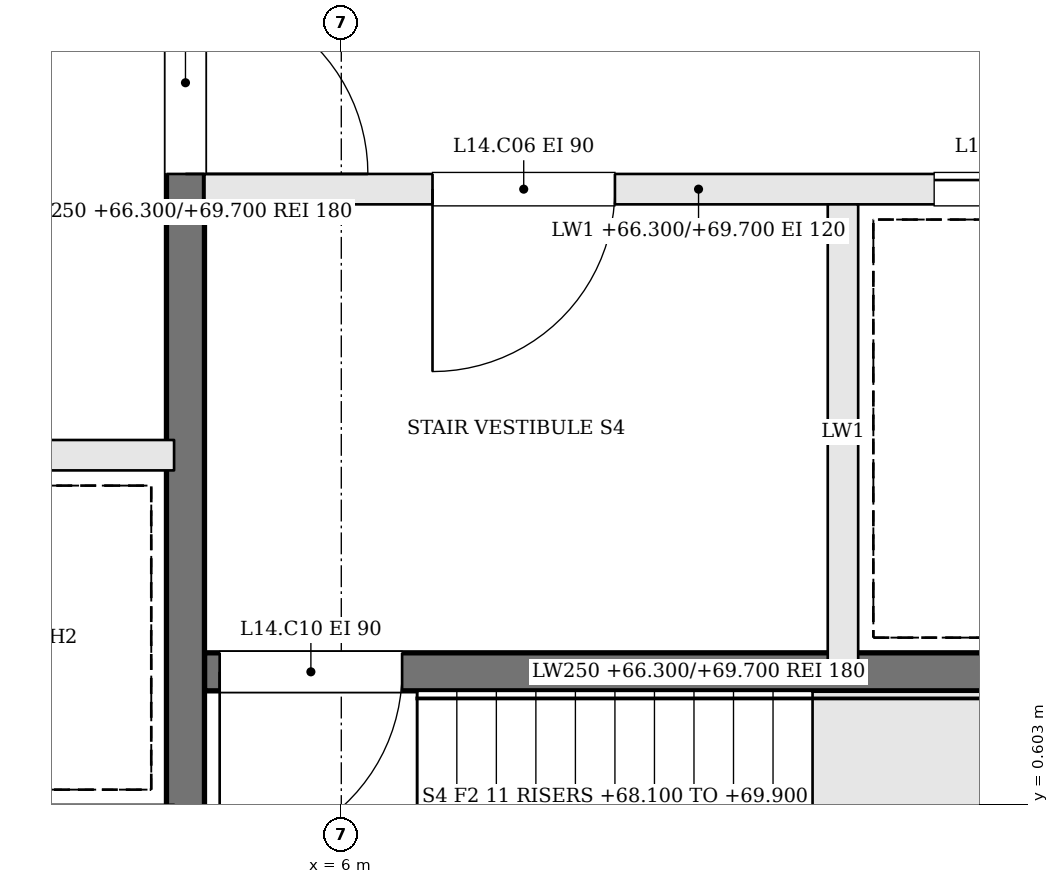
"""IFC4 building model, lengths in metres.
Left out: names, types, materials, properties, quantities, classifications, styles, units other than length and angle.
Written with IfcOpenShell. Run it as: python <this file> out.ifc"""

import sys

from ifc_helpers import new_model, si_unit, direction, frame, frame_2d, origin, place, context, subcontext, project, spatial, rectangle, extrude, element, fill, save


model = new_model("IFC4")
c1 = context("Model", 3, precision=1e-05, world=origin(), true_north=direction((0.0, 1.0)))
c2 = subcontext(c1, "Body", "Model", "MODEL_VIEW")
j1 = project(units=[si_unit("LENGTHUNIT", "METRE"), si_unit("PLANEANGLEUNIT", "RADIAN")], contexts=[c1])
p1 = place(None, origin())
s1 = spatial("IfcSite", under=j1, at=p1, CompositionType="ELEMENT")
p2 = place(p1, origin())
s2 = spatial("IfcBuilding", under=s1, at=p2, CompositionType="ELEMENT")
p3 = place(p2, frame((0.0, 0.0, 66.3)))
s3 = spatial("IfcBuildingStorey", under=s2, at=p3, CompositionType="ELEMENT", Elevation=66.3)
p4 = place(p3, frame((11.6, 4.65, 0.0), z_axis=(0.0, 0.0, 1.0), x_axis=(-1.0, 0.0, 0.0)))
e1 = element("IfcWall", 1, at=p4, inside=s3, PredefinedType="SOLIDWALL", context=c2, shape_type="SweptSolid", body=[
    extrude(rectangle(XDim=6.5, YDim=0.2, at=frame_2d((3.25, 0.0))), origin(), (0.0, 0.0, 1.0), 3.4),
])
p5 = place(p4, frame((3.8, 0.0, 0.0)))
e2 = element("IfcOpeningElement", 2, at=p5, cuts=e1, PredefinedType="OPENING", context=c2, shape_type="SweptSolid", body=[
    extrude(rectangle(XDim=1.2, YDim=2.1, at=frame_2d((0.6, 1.05))), frame((0.0, 0.11, 0.0), z_axis=(0.0, -1.0, 0.0), x_axis=(1.0, 0.0, 0.0)), (0.0, 0.0, 1.0), 0.22),
])
p6 = place(p4, frame((0.5, 0.0, 0.0)))
e3 = element("IfcOpeningElement", 3, at=p6, cuts=e1, PredefinedType="OPENING", context=c2, shape_type="SweptSolid", body=[
    extrude(rectangle(XDim=1.2, YDim=2.1, at=frame_2d((0.6, 1.05))), frame((0.0, 0.11, 0.0), z_axis=(0.0, -1.0, 0.0), x_axis=(1.0, 0.0, 0.0)), (0.0, 0.0, 1.0), 0.22),
])
p7 = place(p3, frame((11.6, 1.475, 0.0), z_axis=(0.0, 0.0, 1.0), x_axis=(-1.0, 0.0, 0.0)))
e4 = element("IfcWall", 4, at=p7, inside=s3, PredefinedType="SOLIDWALL", context=c2, shape_type="SweptSolid", body=[
    extrude(rectangle(XDim=6.5, YDim=0.25, at=frame_2d((3.25, 0.0))), origin(), (0.0, 0.0, 1.0), 3.4),
])
p8 = place(p7, frame((5.2, 0.0, 0.0)))
e5 = element("IfcOpeningElement", 5, at=p8, cuts=e4, PredefinedType="OPENING", context=c2, shape_type="SweptSolid", body=[
    extrude(rectangle(XDim=1.2, YDim=2.1, at=frame_2d((0.6, 1.05))), frame((0.0, 0.135, 0.0), z_axis=(0.0, -1.0, 0.0), x_axis=(1.0, 0.0, 0.0)), (0.0, 0.0, 1.0), 0.27),
])
p9 = place(p3, frame((9.3, 4.55, 0.0), z_axis=(0.0, 0.0, 1.0), x_axis=(0.0, -1.0, 0.0)))
e6 = element("IfcWall", 6, at=p9, inside=s3, PredefinedType="SOLIDWALL", context=c2, shape_type="SweptSolid", body=[
    extrude(rectangle(XDim=3.0, YDim=0.2, at=frame_2d((1.5, 0.0))), origin(), (0.0, 0.0, 1.0), 3.4),
])
p10 = place(p3, frame((4.975, 10.6, 0.0), z_axis=(0.0, 0.0, 1.0), x_axis=(0.0, -1.0, 0.0)))
e7 = element("IfcWall", 7, at=p10, inside=s3, PredefinedType="SOLIDWALL", context=c2, shape_type="SweptSolid", body=[
    extrude(rectangle(XDim=12.2, YDim=0.25, at=frame_2d((6.1, 0.0))), origin(), (0.0, 0.0, 1.0), 3.4),
])
p11 = place(p10, frame((4.65, 0.0, 0.0)))
e8 = element("IfcOpeningElement", 8, at=p11, cuts=e7, PredefinedType="OPENING", context=c2, shape_type="SweptSolid", body=[
    extrude(rectangle(XDim=1.2, YDim=2.1, at=frame_2d((0.6, 1.05))), frame((0.0, 0.135, 0.0), z_axis=(0.0, -1.0, 0.0), x_axis=(1.0, 0.0, 0.0)), (0.0, 0.0, 1.0), 0.27),
])
p12 = place(p3, frame((-4.9, 2.9, 0.0), z_axis=(0.0, 0.0, 1.0), x_axis=(1.0, 0.0, 0.0)))
e9 = element("IfcWall", 9, at=p12, inside=s3, PredefinedType="SOLIDWALL", context=c2, shape_type="SweptSolid", body=[
    extrude(rectangle(XDim=9.8, YDim=0.2, at=frame_2d((4.9, 0.0))), origin(), (0.0, 0.0, 1.0), 3.4),
])
p13 = place(p12, frame((0.675, 0.0, 0.0)))
e10 = element("IfcOpeningElement", 10, at=p13, cuts=e9, PredefinedType="OPENING", context=c2, shape_type="SweptSolid", body=[
    extrude(rectangle(XDim=1.1, YDim=2.1, at=frame_2d((0.55, 1.05))), frame((0.0, 0.11, 0.0), z_axis=(0.0, -1.0, 0.0), x_axis=(1.0, 0.0, 0.0)), (0.0, 0.0, 1.0), 0.22),
])
p14 = place(p12, frame((3.125, 0.0, 0.0)))
e11 = element("IfcOpeningElement", 11, at=p14, cuts=e9, PredefinedType="OPENING", context=c2, shape_type="SweptSolid", body=[
    extrude(rectangle(XDim=1.1, YDim=2.1, at=frame_2d((0.55, 1.05))), frame((0.0, 0.11, 0.0), z_axis=(0.0, -1.0, 0.0), x_axis=(1.0, 0.0, 0.0)), (0.0, 0.0, 1.0), 0.22),
])
p15 = place(p11, origin())
e12 = element("IfcDoor", 12, at=p15, inside=s3, OperationType="SINGLE_SWING_RIGHT", PredefinedType="DOOR", context=c2, shape_type="SweptSolid", body=[
    extrude(rectangle(XDim=1.2, YDim=2.1, at=frame_2d((0.6, 1.05))), frame((0.0, 0.025, 0.0), z_axis=(0.0, -1.0, 0.0), x_axis=(1.0, 0.0, 0.0)), (0.0, 0.0, 1.0), 0.05),
])
fill(e8, e12)
p16 = place(p5, origin())
e13 = element("IfcDoor", 13, at=p16, inside=s3, OperationType="SINGLE_SWING_RIGHT", PredefinedType="DOOR", context=c2, shape_type="SweptSolid", body=[
    extrude(rectangle(XDim=1.2, YDim=2.1, at=frame_2d((0.6, 1.05))), frame((0.0, 0.025, 0.0), z_axis=(0.0, -1.0, 0.0), x_axis=(1.0, 0.0, 0.0)), (0.0, 0.0, 1.0), 0.05),
])
fill(e2, e13)
p17 = place(p8, origin())
e14 = element("IfcDoor", 14, at=p17, inside=s3, OperationType="SINGLE_SWING_RIGHT", PredefinedType="DOOR", context=c2, shape_type="SweptSolid", body=[
    extrude(rectangle(XDim=1.2, YDim=2.1, at=frame_2d((0.6, 1.05))), frame((0.0, 0.025, 0.0), z_axis=(0.0, -1.0, 0.0), x_axis=(1.0, 0.0, 0.0)), (0.0, 0.0, 1.0), 0.05),
])
fill(e5, e14)
p18 = place(p6, origin())
e15 = element("IfcDoor", 15, at=p18, inside=s3, OperationType="SLIDING_TO_RIGHT", PredefinedType="DOOR", context=c2, shape_type="SweptSolid", body=[
    extrude(rectangle(XDim=1.2, YDim=2.1, at=frame_2d((0.6, 1.05))), frame((0.0, 0.025, 0.0), z_axis=(0.0, -1.0, 0.0), x_axis=(1.0, 0.0, 0.0)), (0.0, 0.0, 1.0), 0.05),
])
fill(e3, e15)
save(model, sys.argv[1])
